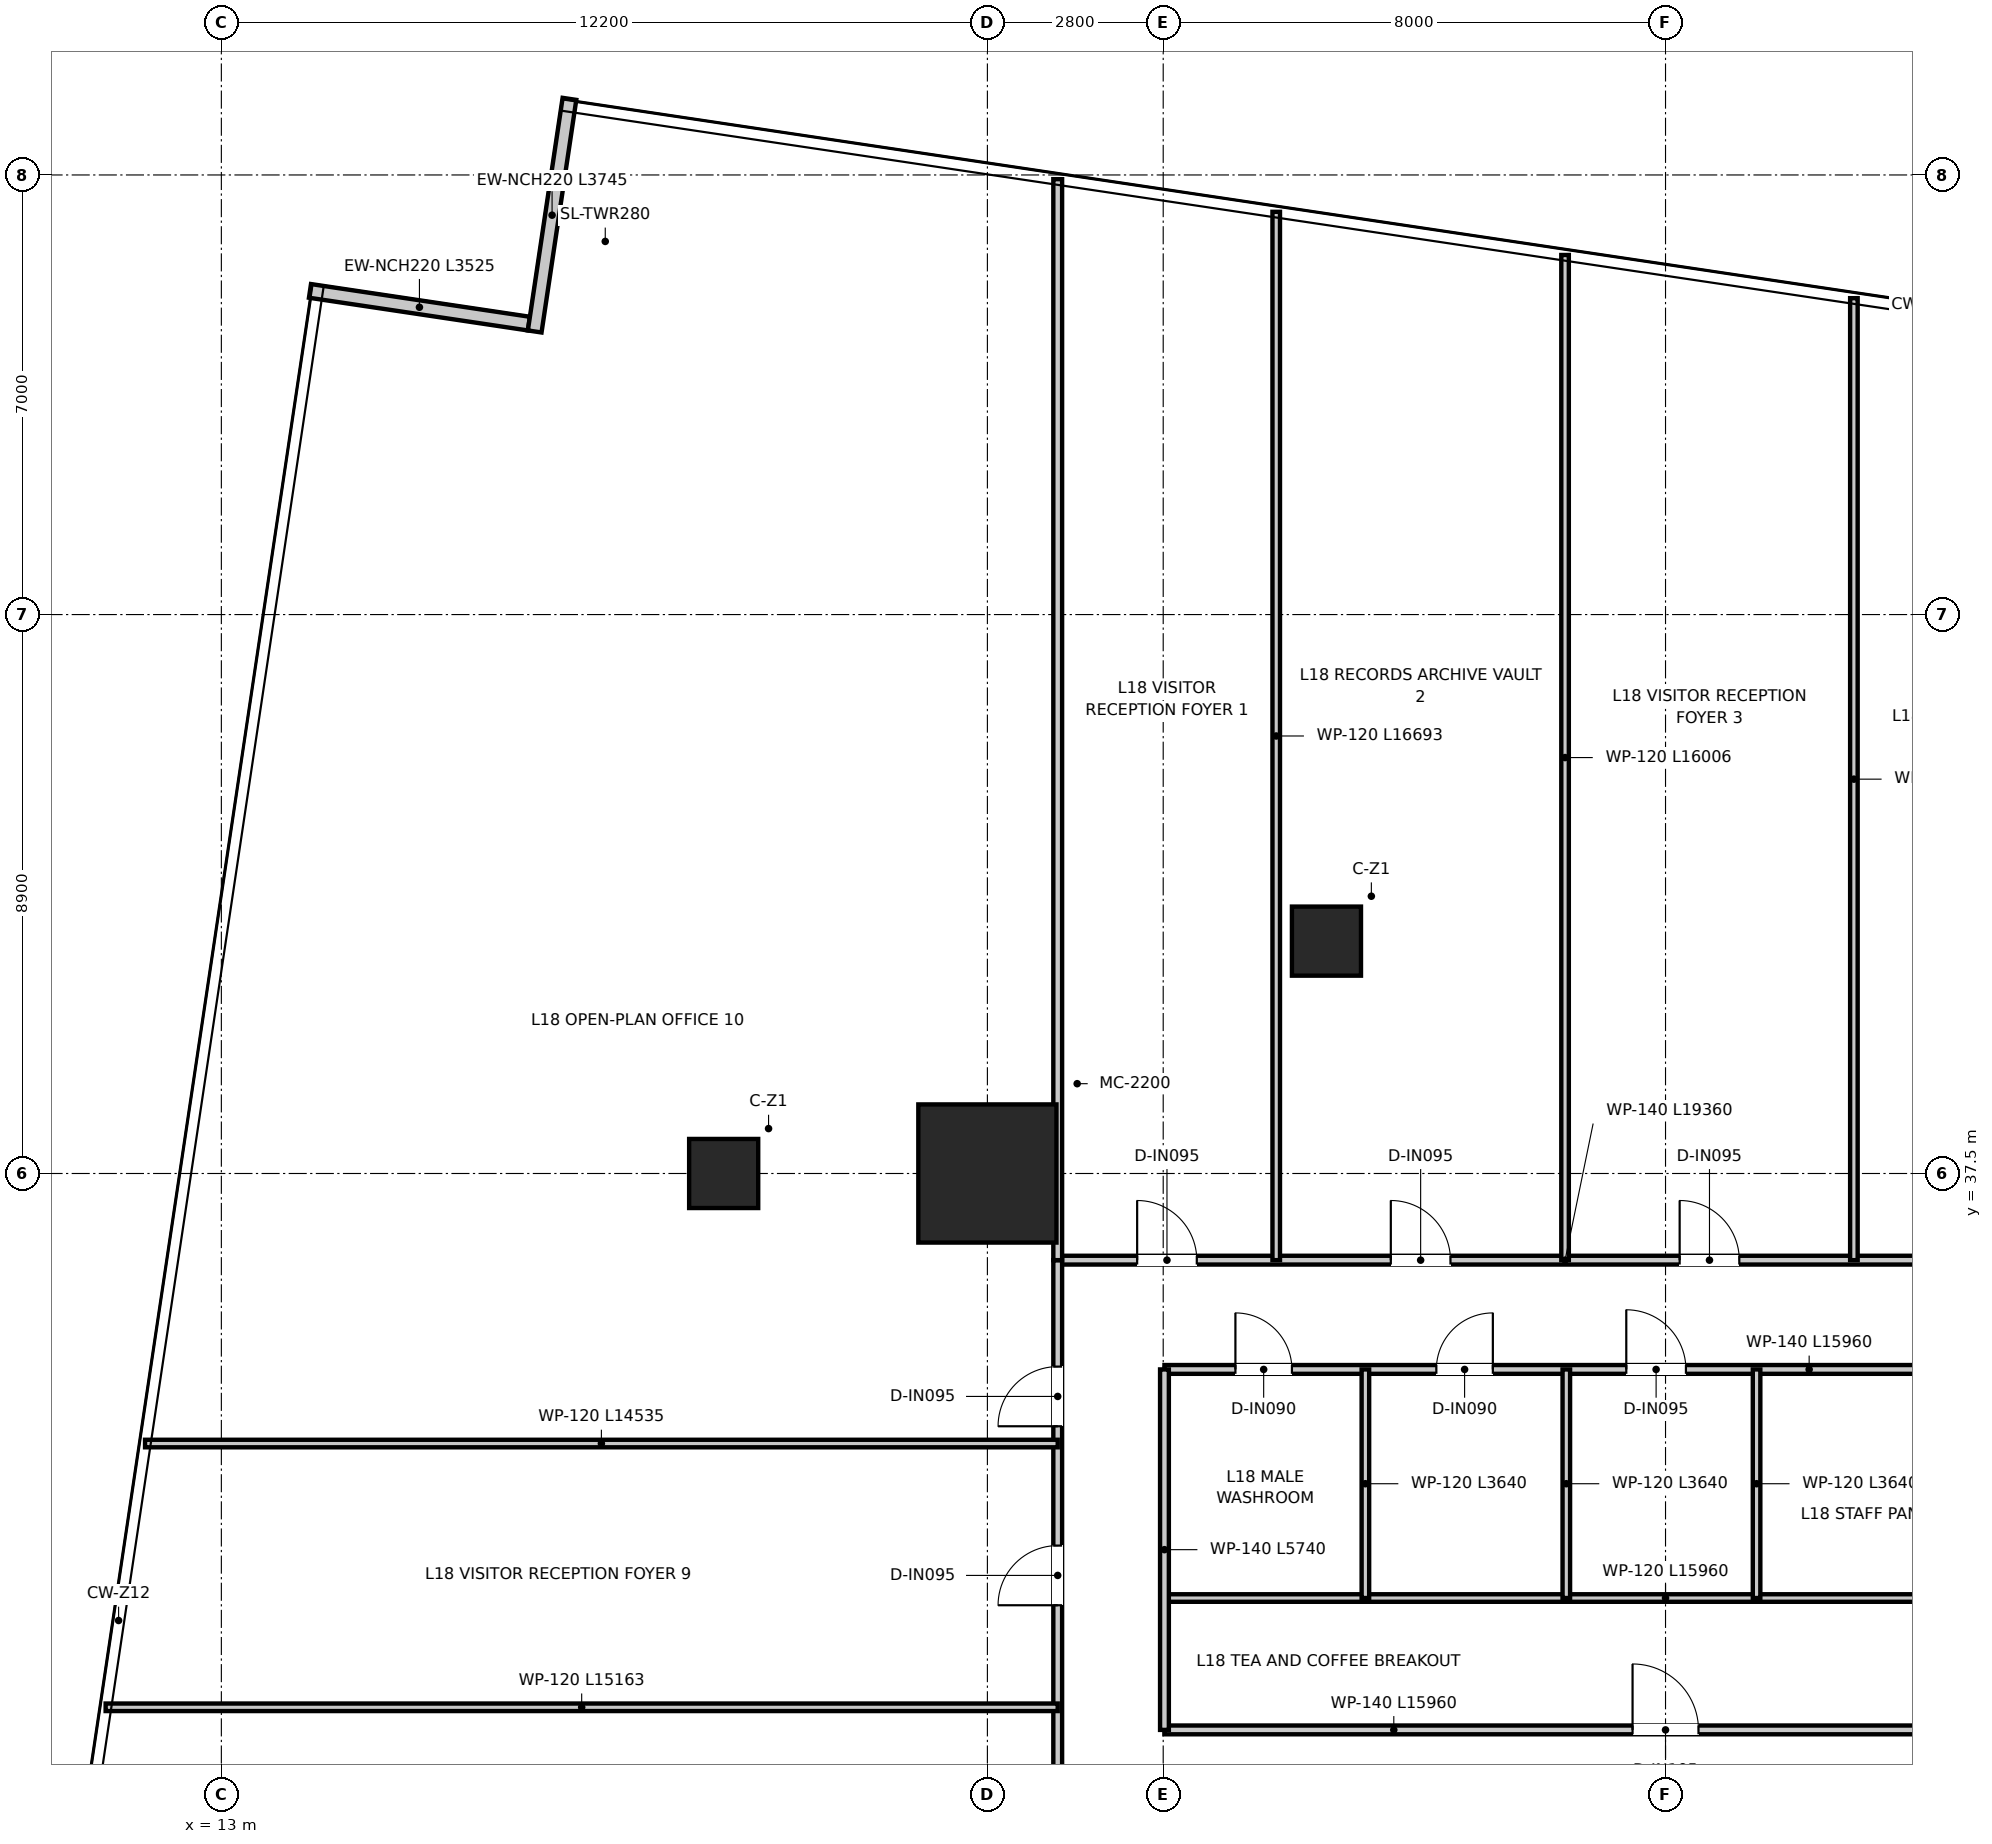
"""IFC4 building model, lengths in metres.
Left out: names, types, materials, properties, quantities, classifications, styles, units other than length and angle.
Written with IfcOpenShell. Run it as: python <this file> out.ifc"""

import sys

from ifc_helpers import new_model, si_unit, direction, frame, frame_2d, origin, origin_2d, place, context, subcontext, project, spatial, rectangle, extrude, source, transform, mapped, element, fill, save


model = new_model("IFC4")
c1 = context("Model", 3, precision=1e-05, world=origin(), true_north=direction((0.0, 1.0)))
c2 = subcontext(c1, "Body", "Model", "MODEL_VIEW")
j1 = project(units=[si_unit("LENGTHUNIT", "METRE"), si_unit("PLANEANGLEUNIT", "RADIAN")], contexts=[c1])
p1 = place(None, origin())
s1 = spatial("IfcSite", under=j1, at=p1, CompositionType="ELEMENT")
p2 = place(p1, origin())
s2 = spatial("IfcBuilding", under=s1, at=p2, CompositionType="ELEMENT")
p3 = place(p2, frame((0.0, 0.0, 76.35)))
s3 = spatial("IfcBuildingStorey", under=s2, at=p3, CompositionType="ELEMENT", Elevation=76.35)
m1 = source(origin(), c2, "Body", "SweptSolid", [
    extrude(rectangle(XDim=2.2, YDim=2.2, at=origin_2d()), origin(), (0.0, 0.0, 1.0), 3.95),
])
p4 = place(p3, frame((25.2, 37.5, 0.0), z_axis=(0.0, 0.0, 1.0), x_axis=(1.0, 0.0, 0.0)))
e1 = element("IfcColumn", 1, at=p4, inside=s3, PredefinedType="USERDEFINED", context=c2, shape_type="MappedRepresentation", body=[
    mapped(m1, transform((0.0, 0.0, 0.0), x_axis=(1.0, 0.0, 0.0), y_axis=(0.0, 1.0, 0.0), z_axis=(0.0, 0.0, 1.0), scale=1.0)),
])
m2 = source(origin(), c2, "Body", "SweptSolid", [
    extrude(rectangle(XDim=1.1, YDim=1.1, at=origin_2d()), origin(), (0.0, 0.0, 1.0), 3.95),
])
for number, where, z_axis, x_axis in (
    (2, (21.0, 37.5, 0.0), (0.0, 0.0, 1.0), (1.0, 0.0, 0.0)),
    (3, (30.6, 41.2, 0.0), (0.0, 0.0, 1.0), (1.0, 0.0, 0.0)),
):
    element("IfcColumn", number, at=place(p3, frame(where, z_axis=z_axis, x_axis=x_axis)), inside=s3, PredefinedType="COLUMN", context=c2, shape_type="MappedRepresentation", body=[
        mapped(m2, transform((0.0, 0.0, 0.0), x_axis=(1.0, 0.0, 0.0), y_axis=(0.0, 1.0, 0.0), z_axis=(0.0, 0.0, 1.0), scale=1.0)),
    ])
p5 = place(p3, frame((17.898, 51.033, 0.0), z_axis=(0.0, 0.0, 1.0), x_axis=(-0.989015973204, 0.147808676155, 0.0)))
e4 = element("IfcWall", 4, at=p5, inside=s3, PredefinedType="ELEMENTEDWALL", context=c2, shape_type="SweptSolid", body=[
    extrude(rectangle(XDim=3.525, YDim=0.22, at=frame_2d((1.762, 0.0))), origin(), (0.0, 0.0, 1.0), 3.59),
])
p6 = place(p3, frame((18.544, 54.612, 0.0), z_axis=(0.0, 0.0, 1.0), x_axis=(-0.147852699435, -0.989009392913, 0.0)))
e5 = element("IfcWall", 5, at=p6, inside=s3, PredefinedType="ELEMENTEDWALL", context=c2, shape_type="SweptSolid", body=[
    extrude(rectangle(XDim=3.745, YDim=0.22, at=frame_2d((1.873, 0.0))), origin(), (0.0, 0.0, 1.0), 3.59),
])
p7 = place(p3, frame((28.02, 28.64, 0.0), z_axis=(0.0, 0.0, 1.0), x_axis=(1.0, 0.0, 0.0)))
e6 = element("IfcWall", 6, at=p7, inside=s3, PredefinedType="PARTITIONING", context=c2, shape_type="SweptSolid", body=[
    extrude(rectangle(XDim=15.96, YDim=0.14, at=frame_2d((7.98, 0.0))), origin(), (0.0, 0.0, 1.0), 3.0),
])
p8 = place(p7, frame((7.455, 0.0, 0.0)))
e7 = element("IfcOpeningElement", 7, at=p8, cuts=e6, PredefinedType="OPENING", context=c2, shape_type="SweptSolid", body=[
    extrude(rectangle(XDim=1.05, YDim=2.15, at=frame_2d((0.525, 1.075))), frame((0.0, 0.08, 0.0), z_axis=(0.0, -1.0, 0.0), x_axis=(1.0, 0.0, 0.0)), (0.0, 0.0, 1.0), 0.16),
])
p9 = place(p3, frame((28.02, 30.74, 0.0), z_axis=(0.0, 0.0, 1.0), x_axis=(1.0, 0.0, 0.0)))
e8 = element("IfcWall", 8, at=p9, inside=s3, PredefinedType="PARTITIONING", context=c2, shape_type="SweptSolid", body=[
    extrude(rectangle(XDim=15.96, YDim=0.12, at=frame_2d((7.98, 0.0))), origin(), (0.0, 0.0, 1.0), 3.0),
])
p10 = place(p3, frame((28.02, 34.38, 0.0), z_axis=(0.0, 0.0, 1.0), x_axis=(1.0, 0.0, 0.0)))
e9 = element("IfcWall", 9, at=p10, inside=s3, PredefinedType="PARTITIONING", context=c2, shape_type="SweptSolid", body=[
    extrude(rectangle(XDim=15.96, YDim=0.14, at=frame_2d((7.98, 0.0))), origin(), (0.0, 0.0, 1.0), 3.0),
])
p11 = place(p10, frame((1.13, 0.0, 0.0)))
e10 = element("IfcOpeningElement", 10, at=p11, cuts=e9, PredefinedType="OPENING", context=c2, shape_type="SweptSolid", body=[
    extrude(rectangle(XDim=0.9, YDim=2.1, at=frame_2d((0.45, 1.05))), frame((0.0, 0.08, 0.0), z_axis=(0.0, -1.0, 0.0), x_axis=(1.0, 0.0, 0.0)), (0.0, 0.0, 1.0), 0.16),
])
p12 = place(p10, frame((4.33, 0.0, 0.0)))
e11 = element("IfcOpeningElement", 11, at=p12, cuts=e9, PredefinedType="OPENING", context=c2, shape_type="SweptSolid", body=[
    extrude(rectangle(XDim=0.9, YDim=2.1, at=frame_2d((0.45, 1.05))), frame((0.0, 0.08, 0.0), z_axis=(0.0, -1.0, 0.0), x_axis=(1.0, 0.0, 0.0)), (0.0, 0.0, 1.0), 0.16),
])
p13 = place(p10, frame((7.355, 0.0, 0.0)))
e12 = element("IfcOpeningElement", 12, at=p13, cuts=e9, PredefinedType="OPENING", context=c2, shape_type="SweptSolid", body=[
    extrude(rectangle(XDim=0.95, YDim=2.1, at=frame_2d((0.475, 1.05))), frame((0.0, 0.08, 0.0), z_axis=(0.0, -1.0, 0.0), x_axis=(1.0, 0.0, 0.0)), (0.0, 0.0, 1.0), 0.16),
])
p14 = place(p10, frame((12.23, 0.0, 0.0)))
e13 = element("IfcOpeningElement", 13, at=p14, cuts=e9, PredefinedType="OPENING", context=c2, shape_type="SweptSolid", body=[
    extrude(rectangle(XDim=0.95, YDim=2.1, at=frame_2d((0.475, 1.05))), frame((0.0, 0.08, 0.0), z_axis=(0.0, -1.0, 0.0), x_axis=(1.0, 0.0, 0.0)), (0.0, 0.0, 1.0), 0.16),
])
p15 = place(p3, frame((28.02, 28.64, 0.0), z_axis=(0.0, 0.0, 1.0), x_axis=(0.0, 1.0, 0.0)))
e14 = element("IfcWall", 14, at=p15, inside=s3, PredefinedType="PARTITIONING", context=c2, shape_type="SweptSolid", body=[
    extrude(rectangle(XDim=5.74, YDim=0.14, at=frame_2d((2.87, 0.0))), origin(), (0.0, 0.0, 1.0), 3.14),
])
for number, where, z_axis, x_axis in (
    (15, (31.22, 30.74, 0.0), (0.0, 0.0, 1.0), (0.0, 1.0, 0.0)),
    (16, (34.42, 30.74, 0.0), (0.0, 0.0, 1.0), (0.0, 1.0, 0.0)),
    (17, (37.45, 30.74, 0.0), (0.0, 0.0, 1.0), (0.0, 1.0, 0.0)),
):
    element("IfcWall", number, at=place(p3, frame(where, z_axis=z_axis, x_axis=x_axis)), inside=s3, PredefinedType="PARTITIONING", context=c2, shape_type="SweptSolid", body=[
        extrude(rectangle(XDim=3.64, YDim=0.12, at=frame_2d((1.82, 0.0))), origin(), (0.0, 0.0, 1.0), 3.04),
    ])
p16 = place(p3, frame((26.32, 36.12, 0.0), z_axis=(0.0, 0.0, 1.0), x_axis=(1.0, 0.0, 0.0)))
e18 = element("IfcWall", 18, at=p16, inside=s3, PredefinedType="PARTITIONING", context=c2, shape_type="SweptSolid", body=[
    extrude(rectangle(XDim=19.36, YDim=0.14, at=frame_2d((9.68, 0.0))), origin(), (0.0, 0.0, 1.0), 3.0),
])
p17 = place(p16, frame((1.265, 0.0, 0.0)))
e19 = element("IfcOpeningElement", 19, at=p17, cuts=e18, PredefinedType="OPENING", context=c2, shape_type="SweptSolid", body=[
    extrude(rectangle(XDim=0.95, YDim=2.1, at=frame_2d((0.475, 1.05))), frame((0.0, 0.08, 0.0), z_axis=(0.0, -1.0, 0.0), x_axis=(1.0, 0.0, 0.0)), (0.0, 0.0, 1.0), 0.16),
])
p18 = place(p16, frame((5.305, 0.0, 0.0)))
e20 = element("IfcOpeningElement", 20, at=p18, cuts=e18, PredefinedType="OPENING", context=c2, shape_type="SweptSolid", body=[
    extrude(rectangle(XDim=0.95, YDim=2.1, at=frame_2d((0.475, 1.05))), frame((0.0, 0.08, 0.0), z_axis=(0.0, -1.0, 0.0), x_axis=(1.0, 0.0, 0.0)), (0.0, 0.0, 1.0), 0.16),
])
p19 = place(p16, frame((9.905, 0.0, 0.0)))
e21 = element("IfcOpeningElement", 21, at=p19, cuts=e18, PredefinedType="OPENING", context=c2, shape_type="SweptSolid", body=[
    extrude(rectangle(XDim=0.95, YDim=2.1, at=frame_2d((0.475, 1.05))), frame((0.0, 0.08, 0.0), z_axis=(0.0, -1.0, 0.0), x_axis=(1.0, 0.0, 0.0)), (0.0, 0.0, 1.0), 0.16),
])
p20 = place(p16, frame((14.305, 0.0, 0.0)))
e22 = element("IfcOpeningElement", 22, at=p20, cuts=e18, PredefinedType="OPENING", context=c2, shape_type="SweptSolid", body=[
    extrude(rectangle(XDim=0.95, YDim=2.1, at=frame_2d((0.475, 1.05))), frame((0.0, 0.08, 0.0), z_axis=(0.0, -1.0, 0.0), x_axis=(1.0, 0.0, 0.0)), (0.0, 0.0, 1.0), 0.16),
])
p21 = place(p16, frame((17.645, 0.0, 0.0)))
e23 = element("IfcOpeningElement", 23, at=p21, cuts=e18, PredefinedType="OPENING", context=c2, shape_type="SweptSolid", body=[
    extrude(rectangle(XDim=0.95, YDim=2.1, at=frame_2d((0.475, 1.05))), frame((0.0, 0.08, 0.0), z_axis=(0.0, -1.0, 0.0), x_axis=(1.0, 0.0, 0.0)), (0.0, 0.0, 1.0), 0.16),
])
p22 = place(p3, frame((26.32, 10.5, 0.0), z_axis=(0.0, 0.0, 1.0), x_axis=(0.0, 1.0, 0.0)))
e24 = element("IfcWall", 24, at=p22, inside=s3, PredefinedType="PARTITIONING", context=c2, shape_type="SweptSolid", body=[
    extrude(rectangle(XDim=25.62, YDim=0.14, at=frame_2d((12.81, 0.0))), origin(), (0.0, 0.0, 1.0), 2.89),
])
p23 = place(p22, frame((7.775, 0.0, 0.0)))
e25 = element("IfcOpeningElement", 25, at=p23, cuts=e24, PredefinedType="OPENING", context=c2, shape_type="SweptSolid", body=[
    extrude(rectangle(XDim=0.95, YDim=2.1, at=frame_2d((0.475, 1.05))), frame((0.0, 0.08, 0.0), z_axis=(0.0, -1.0, 0.0), x_axis=(1.0, 0.0, 0.0)), (0.0, 0.0, 1.0), 0.16),
])
p24 = place(p22, frame((11.275, 0.0, 0.0)))
e26 = element("IfcOpeningElement", 26, at=p24, cuts=e24, PredefinedType="OPENING", context=c2, shape_type="SweptSolid", body=[
    extrude(rectangle(XDim=0.95, YDim=2.1, at=frame_2d((0.475, 1.05))), frame((0.0, 0.08, 0.0), z_axis=(0.0, -1.0, 0.0), x_axis=(1.0, 0.0, 0.0)), (0.0, 0.0, 1.0), 0.16),
])
p25 = place(p22, frame((15.775, 0.0, 0.0)))
e27 = element("IfcOpeningElement", 27, at=p25, cuts=e24, PredefinedType="OPENING", context=c2, shape_type="SweptSolid", body=[
    extrude(rectangle(XDim=0.95, YDim=2.1, at=frame_2d((0.475, 1.05))), frame((0.0, 0.08, 0.0), z_axis=(0.0, -1.0, 0.0), x_axis=(1.0, 0.0, 0.0)), (0.0, 0.0, 1.0), 0.16),
])
p26 = place(p22, frame((20.125, 0.0, 0.0)))
e28 = element("IfcOpeningElement", 28, at=p26, cuts=e24, PredefinedType="OPENING", context=c2, shape_type="SweptSolid", body=[
    extrude(rectangle(XDim=0.95, YDim=2.1, at=frame_2d((0.475, 1.05))), frame((0.0, 0.08, 0.0), z_axis=(0.0, -1.0, 0.0), x_axis=(1.0, 0.0, 0.0)), (0.0, 0.0, 1.0), 0.16),
])
p27 = place(p22, frame((22.975, 0.0, 0.0)))
e29 = element("IfcOpeningElement", 29, at=p27, cuts=e24, PredefinedType="OPENING", context=c2, shape_type="SweptSolid", body=[
    extrude(rectangle(XDim=0.95, YDim=2.1, at=frame_2d((0.475, 1.05))), frame((0.0, 0.08, 0.0), z_axis=(0.0, -1.0, 0.0), x_axis=(1.0, 0.0, 0.0)), (0.0, 0.0, 1.0), 0.16),
])
p28 = place(p3, frame((26.32, 36.12, 0.0), z_axis=(0.0, 0.0, 1.0), x_axis=(0.0, 1.0, 0.0)))
e30 = element("IfcWall", 30, at=p28, inside=s3, PredefinedType="PARTITIONING", context=c2, shape_type="SweptSolid", body=[
    extrude(rectangle(XDim=17.213, YDim=0.14, at=frame_2d((8.606, 0.0))), origin(), (0.0, 0.0, 1.0), 2.89),
])
p29 = place(p3, frame((29.8, 36.12, 0.0), z_axis=(0.0, 0.0, 1.0), x_axis=(0.0, 1.0, 0.0)))
e31 = element("IfcWall", 31, at=p29, inside=s3, PredefinedType="PARTITIONING", context=c2, shape_type="SweptSolid", body=[
    extrude(rectangle(XDim=16.693, YDim=0.12, at=frame_2d((8.347, 0.0))), origin(), (0.0, 0.0, 1.0), 2.89),
])
p30 = place(p3, frame((34.4, 36.12, 0.0), z_axis=(0.0, 0.0, 1.0), x_axis=(0.0, 1.0, 0.0)))
e32 = element("IfcWall", 32, at=p30, inside=s3, PredefinedType="PARTITIONING", context=c2, shape_type="SweptSolid", body=[
    extrude(rectangle(XDim=16.006, YDim=0.12, at=frame_2d((8.003, 0.0))), origin(), (0.0, 0.0, 1.0), 2.89),
])
p31 = place(p3, frame((39.0, 36.12, 0.0), z_axis=(0.0, 0.0, 1.0), x_axis=(0.0, 1.0, 0.0)))
e33 = element("IfcWall", 33, at=p31, inside=s3, PredefinedType="PARTITIONING", context=c2, shape_type="SweptSolid", body=[
    extrude(rectangle(XDim=15.318, YDim=0.12, at=frame_2d((7.659, 0.0))), origin(), (0.0, 0.0, 1.0), 2.89),
])
p32 = place(p3, frame((11.157, 29.0, 0.0), z_axis=(0.0, 0.0, 1.0), x_axis=(1.0, 0.0, 0.0)))
e34 = element("IfcWall", 34, at=p32, inside=s3, PredefinedType="PARTITIONING", context=c2, shape_type="SweptSolid", body=[
    extrude(rectangle(XDim=15.163, YDim=0.12, at=frame_2d((7.582, 0.0))), origin(), (0.0, 0.0, 1.0), 2.89),
])
p33 = place(p3, frame((11.785, 33.2, 0.0), z_axis=(0.0, 0.0, 1.0), x_axis=(1.0, 0.0, 0.0)))
e35 = element("IfcWall", 35, at=p33, inside=s3, PredefinedType="PARTITIONING", context=c2, shape_type="SweptSolid", body=[
    extrude(rectangle(XDim=14.535, YDim=0.12, at=frame_2d((7.268, 0.0))), origin(), (0.0, 0.0, 1.0), 2.89),
])
p34 = place(p8, origin())
e36 = element("IfcDoor", 36, at=p34, inside=s3, OperationType="SINGLE_SWING_LEFT", PredefinedType="DOOR", context=c2, shape_type="SweptSolid", body=[
    extrude(rectangle(XDim=1.05, YDim=2.15, at=frame_2d((0.525, 1.075))), frame((0.0, 0.025, 0.0), z_axis=(0.0, -1.0, 0.0), x_axis=(1.0, 0.0, 0.0)), (0.0, 0.0, 1.0), 0.05),
])
fill(e7, e36)
p35 = place(p11, origin())
e37 = element("IfcDoor", 37, at=p35, inside=s3, OperationType="SINGLE_SWING_LEFT", PredefinedType="DOOR", context=c2, shape_type="SweptSolid", body=[
    extrude(rectangle(XDim=0.9, YDim=2.1, at=frame_2d((0.45, 1.05))), frame((0.0, 0.025, 0.0), z_axis=(0.0, -1.0, 0.0), x_axis=(1.0, 0.0, 0.0)), (0.0, 0.0, 1.0), 0.05),
])
fill(e10, e37)
p36 = place(p12, origin())
e38 = element("IfcDoor", 38, at=p36, inside=s3, OperationType="SINGLE_SWING_RIGHT", PredefinedType="DOOR", context=c2, shape_type="SweptSolid", body=[
    extrude(rectangle(XDim=0.9, YDim=2.1, at=frame_2d((0.45, 1.05))), frame((0.0, 0.025, 0.0), z_axis=(0.0, -1.0, 0.0), x_axis=(1.0, 0.0, 0.0)), (0.0, 0.0, 1.0), 0.05),
])
fill(e11, e38)
p37 = place(p13, origin())
e39 = element("IfcDoor", 39, at=p37, inside=s3, OperationType="SINGLE_SWING_LEFT", PredefinedType="DOOR", context=c2, shape_type="SweptSolid", body=[
    extrude(rectangle(XDim=0.95, YDim=2.1, at=frame_2d((0.475, 1.05))), frame((0.0, 0.025, 0.0), z_axis=(0.0, -1.0, 0.0), x_axis=(1.0, 0.0, 0.0)), (0.0, 0.0, 1.0), 0.05),
])
fill(e12, e39)
p38 = place(p17, origin())
e40 = element("IfcDoor", 40, at=p38, inside=s3, OperationType="SINGLE_SWING_LEFT", PredefinedType="DOOR", context=c2, shape_type="SweptSolid", body=[
    extrude(rectangle(XDim=0.95, YDim=2.1, at=frame_2d((0.475, 1.05))), frame((0.0, 0.025, 0.0), z_axis=(0.0, -1.0, 0.0), x_axis=(1.0, 0.0, 0.0)), (0.0, 0.0, 1.0), 0.05),
])
fill(e19, e40)
p39 = place(p18, origin())
e41 = element("IfcDoor", 41, at=p39, inside=s3, OperationType="SINGLE_SWING_LEFT", PredefinedType="DOOR", context=c2, shape_type="SweptSolid", body=[
    extrude(rectangle(XDim=0.95, YDim=2.1, at=frame_2d((0.475, 1.05))), frame((0.0, 0.025, 0.0), z_axis=(0.0, -1.0, 0.0), x_axis=(1.0, 0.0, 0.0)), (0.0, 0.0, 1.0), 0.05),
])
fill(e20, e41)
p40 = place(p19, origin())
e42 = element("IfcDoor", 42, at=p40, inside=s3, OperationType="SINGLE_SWING_LEFT", PredefinedType="DOOR", context=c2, shape_type="SweptSolid", body=[
    extrude(rectangle(XDim=0.95, YDim=2.1, at=frame_2d((0.475, 1.05))), frame((0.0, 0.025, 0.0), z_axis=(0.0, -1.0, 0.0), x_axis=(1.0, 0.0, 0.0)), (0.0, 0.0, 1.0), 0.05),
])
fill(e21, e42)
p41 = place(p26, origin())
e43 = element("IfcDoor", 43, at=p41, inside=s3, OperationType="SINGLE_SWING_LEFT", PredefinedType="DOOR", context=c2, shape_type="SweptSolid", body=[
    extrude(rectangle(XDim=0.95, YDim=2.1, at=frame_2d((0.475, 1.05))), frame((0.0, 0.025, 0.0), z_axis=(0.0, -1.0, 0.0), x_axis=(1.0, 0.0, 0.0)), (0.0, 0.0, 1.0), 0.05),
])
fill(e28, e43)
p42 = place(p27, origin())
e44 = element("IfcDoor", 44, at=p42, inside=s3, OperationType="SINGLE_SWING_LEFT", PredefinedType="DOOR", context=c2, shape_type="SweptSolid", body=[
    extrude(rectangle(XDim=0.95, YDim=2.1, at=frame_2d((0.475, 1.05))), frame((0.0, 0.025, 0.0), z_axis=(0.0, -1.0, 0.0), x_axis=(1.0, 0.0, 0.0)), (0.0, 0.0, 1.0), 0.05),
])
fill(e29, e44)
save(model, sys.argv[1])
